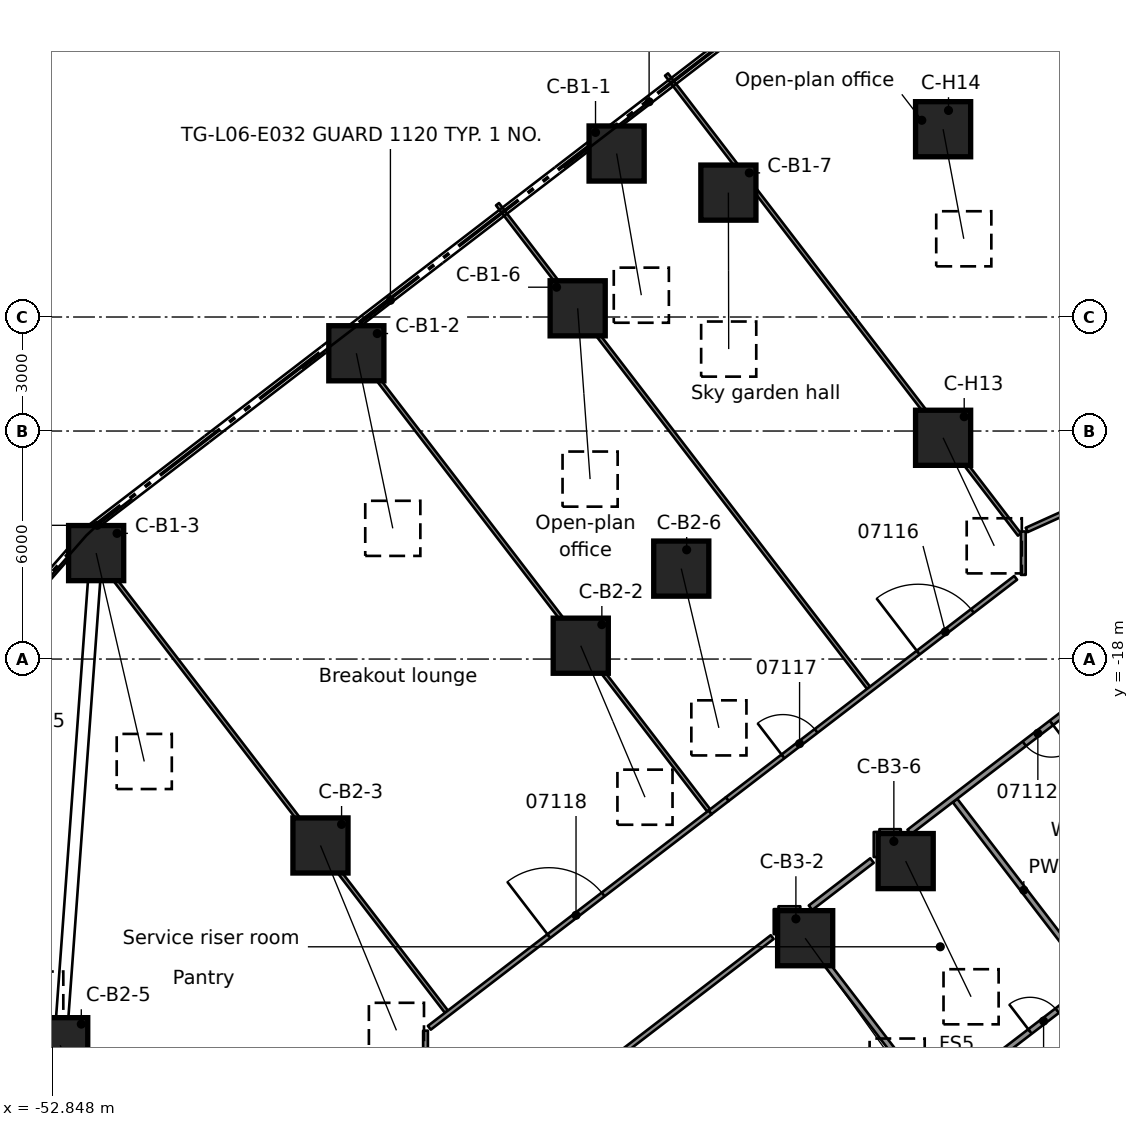
"""IFC4 building model, lengths in metres.
Left out: names, types, materials, properties, quantities, classifications, styles, units other than length and angle.
Written with IfcOpenShell. Run it as: python <this file> out.ifc"""

import sys

from ifc_helpers import new_model, si_unit, direction, frame, frame_2d, origin, origin_2d, place, context, subcontext, project, spatial, rectangle, extrude, element, fill, save


model = new_model("IFC4")
c1 = context("Model", 3, precision=1e-05, world=origin(), true_north=direction((0.0, 1.0)))
c2 = subcontext(c1, "Body", "Model", "MODEL_VIEW")
j1 = project(units=[si_unit("LENGTHUNIT", "METRE"), si_unit("PLANEANGLEUNIT", "RADIAN")], contexts=[c1])
p1 = place(None, origin())
s1 = spatial("IfcSite", under=j1, at=p1, CompositionType="ELEMENT")
p2 = place(p1, origin())
s2 = spatial("IfcBuilding", under=s1, at=p2, CompositionType="ELEMENT")
p3 = place(p2, frame((0.0, 0.0, 33.3)))
s3 = spatial("IfcBuildingStorey", under=s2, at=p3, CompositionType="ELEMENT", Elevation=33.3)
p4 = place(p3, frame((-37.991, -4.698, 0.58), z_axis=(0.137353584737, -0.787899789229, 0.600289859063), x_axis=(0.985142543064, 0.171738667298, 0.0)))
e1 = element("IfcColumn", 1, at=p4, inside=s3, PredefinedType="COLUMN", context=c2, shape_type="SweptSolid", body=[
    extrude(rectangle(XDim=1.45, YDim=1.45, at=origin_2d()), origin(), (0.0, 0.0, 1.0), 4.732),
])
p5 = place(p3, frame((-44.84, -9.954, 0.626), z_axis=(0.175985891109, -0.845431202961, 0.504256925773), x_axis=(0.979014073613, 0.20379264871, 0.0)))
e2 = element("IfcColumn", 2, at=p5, inside=s3, PredefinedType="COLUMN", context=c2, shape_type="SweptSolid", body=[
    extrude(rectangle(XDim=1.45, YDim=1.45, at=origin_2d()), origin(), (0.0, 0.0, 1.0), 5.449),
])
p6 = place(p3, frame((-51.687, -15.212, 0.654), z_axis=(0.20296345223, -0.878973423379, 0.431522372598), x_axis=(0.974361208205, 0.224989412964, 0.0)))
e3 = element("IfcColumn", 3, at=p6, inside=s3, PredefinedType="COLUMN", context=c2, shape_type="SweptSolid", body=[
    extrude(rectangle(XDim=1.45, YDim=1.45, at=origin_2d()), origin(), (0.0, 0.0, 1.0), 6.238),
])
p7 = place(p3, frame((-54.884, -20.946, 0.666), z_axis=(0.237851709207, -0.887565661499, 0.394529797296), x_axis=(0.965917879508, 0.258848701071, 0.0)))
e4 = element("IfcColumn", 4, at=p7, inside=s3, PredefinedType="COLUMN", context=c2, shape_type="SweptSolid", body=[
    extrude(rectangle(XDim=1.45, YDim=1.45, at=origin_2d()), origin(), (0.0, 0.0, 1.0), 6.761),
])
p8 = place(p3, frame((-39.016, -8.771, 0.618), z_axis=(0.06189008129, -0.85015725844, 0.522878813647), x_axis=(0.997360682952, 0.072606253879, 0.0)))
e5 = element("IfcColumn", 5, at=p8, inside=s3, PredefinedType="COLUMN", context=c2, shape_type="SweptSolid", body=[
    extrude(rectangle(XDim=1.45, YDim=1.45, at=origin_2d()), origin(), (0.0, 0.0, 1.0), 5.286),
])
p9 = place(p3, frame((-35.05, -5.727, 0.599), z_axis=(0.001617929852, -0.826762154334, 0.562549306697), x_axis=(0.999998085184, 0.001956943415, 0.0)))
e6 = element("IfcColumn", 6, at=p9, inside=s3, PredefinedType="COLUMN", context=c2, shape_type="SweptSolid", body=[
    extrude(rectangle(XDim=1.45, YDim=1.45, at=origin_2d()), origin(), (0.0, 0.0, 1.0), 4.979),
])
p10 = place(p3, frame((-38.935, -17.649, 0.61), z_axis=(0.328456976926, -0.774735201136, 0.540278985737), x_axis=(0.920675138709, 0.390329718267, 0.0)))
e7 = element("IfcColumn", 7, at=p10, inside=s3, PredefinedType="COLUMN", context=c2, shape_type="SweptSolid", body=[
    extrude(rectangle(XDim=1.45, YDim=1.45, at=origin_2d()), origin(), (0.0, 0.0, 1.0), 5.145),
])
p11 = place(p3, frame((-45.784, -22.905, 0.644), z_axis=(0.337825549268, -0.822160444585, 0.45817693266), x_axis=(0.924959508437, 0.380065662422, 0.0)))
e8 = element("IfcColumn", 8, at=p11, inside=s3, PredefinedType="COLUMN", context=c2, shape_type="SweptSolid", body=[
    extrude(rectangle(XDim=1.45, YDim=1.45, at=origin_2d()), origin(), (0.0, 0.0, 1.0), 5.917),
])
p12 = place(p3, frame((-52.633, -28.161, 0.666), z_axis=(0.342432498317, -0.852060724604, 0.395894563846), x_axis=(0.927871568112, 0.372899923692, 0.0)))
e9 = element("IfcColumn", 9, at=p12, inside=s3, PredefinedType="COLUMN", context=c2, shape_type="SweptSolid", body=[
    extrude(rectangle(XDim=1.45, YDim=1.45, at=origin_2d()), origin(), (0.0, 0.0, 1.0), 6.74),
])
p13 = place(p3, frame((-36.29, -15.62, 0.609), z_axis=(0.193103863156, -0.817465083831, 0.542643284997), x_axis=(0.973215294327, 0.229895608674, 0.0)))
e10 = element("IfcColumn", 10, at=p13, inside=s3, PredefinedType="COLUMN", context=c2, shape_type="SweptSolid", body=[
    extrude(rectangle(XDim=1.45, YDim=1.45, at=origin_2d()), origin(), (0.0, 0.0, 1.0), 5.127),
])
p14 = place(p3, frame((-33.03, -25.345, 0.601), z_axis=(0.484075605361, -0.672785526742, 0.559491236125), x_axis=(0.811723079597, 0.584042500208, 0.0)))
e11 = element("IfcColumn", 11, at=p14, inside=s3, PredefinedType="COLUMN", context=c2, shape_type="SweptSolid", body=[
    extrude(rectangle(XDim=1.45, YDim=1.45, at=origin_2d()), origin(), (0.0, 0.0, 1.0), 5.001),
])
p15 = place(p3, frame((-30.385, -23.316, 0.591), z_axis=(0.353875242444, -0.734106635021, 0.579534089768), x_axis=(0.90080181457, 0.434230458244, 0.0)))
e12 = element("IfcColumn", 12, at=p15, inside=s3, PredefinedType="COLUMN", context=c2, shape_type="SweptSolid", body=[
    extrude(rectangle(XDim=1.45, YDim=1.45, at=origin_2d()), origin(), (0.0, 0.0, 1.0), 4.863),
])
p16 = place(p3, frame((-29.4, -12.178, 0.53), z_axis=(0.312560635038, -0.660215598589, 0.682950373603), x_axis=(0.903829481424, 0.427892823623, 0.0)))
e13 = element("IfcColumn", 13, at=p16, inside=s3, PredefinedType="COLUMN", context=c2, shape_type="SweptSolid", body=[
    extrude(rectangle(XDim=1.45, YDim=1.45, at=origin_2d()), origin(), (0.0, 0.0, 1.0), 4.306),
])
p17 = place(p3, frame((-29.4, -4.059, 0.508), z_axis=(0.130006651481, -0.68901191234, 0.712994288353), x_axis=(0.98266050942, 0.185413924034, 0.0)))
e14 = element("IfcColumn", 14, at=p17, inside=s3, PredefinedType="COLUMN", context=c2, shape_type="SweptSolid", body=[
    extrude(rectangle(XDim=1.45, YDim=1.45, at=origin_2d()), origin(), (0.0, 0.0, 1.0), 4.184),
])
p18 = place(p3, frame((-52.2, -14.599, 0.0), z_axis=(0.0, 0.0, 1.0), x_axis=(0.608803805545, -0.793320821833, 0.0)))
e15 = element("IfcWall", 15, at=p18, inside=s3, PredefinedType="PARTITIONING", context=c2, shape_type="SweptSolid", body=[
    extrude(rectangle(XDim=15.982, YDim=0.1, at=frame_2d((7.991, 0.0))), origin(), (0.0, 0.0, 1.0), 3.56),
])
p19 = place(p3, frame((-45.331, -9.259, 0.0), z_axis=(0.0, 0.0, 1.0), x_axis=(0.608773776811, -0.793343865337, 0.0)))
e16 = element("IfcWall", 16, at=p19, inside=s3, PredefinedType="PARTITIONING", context=c2, shape_type="SweptSolid", body=[
    extrude(rectangle(XDim=16.037, YDim=0.1, at=frame_2d((8.019, 0.0))), origin(), (0.0, 0.0, 1.0), 3.56),
])
p20 = place(p3, frame((-33.482, -24.701, 0.0), z_axis=(0.0, 0.0, 1.0), x_axis=(0.608730316576, -0.793377212731, 0.0)))
e17 = element("IfcWall", 17, at=p20, inside=s3, PredefinedType="PARTITIONING", context=c2, shape_type="SweptSolid", body=[
    extrude(rectangle(XDim=6.261, YDim=0.15, at=frame_2d((3.13, 0.0))), origin(), (0.0, 0.0, 1.0), 3.56),
])
p21 = place(p3, frame((-41.126, -6.032, 0.0), z_axis=(0.0, 0.0, 1.0), x_axis=(0.608773776811, -0.793343865337, 0.0)))
e18 = element("IfcWall", 18, at=p21, inside=s3, PredefinedType="PARTITIONING", context=c2, shape_type="SweptSolid", body=[
    extrude(rectangle(XDim=16.037, YDim=0.1, at=frame_2d((8.019, 0.0))), origin(), (0.0, 0.0, 1.0), 3.56),
])
p22 = place(p3, frame((-29.087, -21.722, 0.0), z_axis=(0.0, 0.0, 1.0), x_axis=(0.608744291625, -0.793366489975, 0.0)))
e19 = element("IfcWall", 19, at=p22, inside=s3, PredefinedType="PARTITIONING", context=c2, shape_type="SweptSolid", body=[
    extrude(rectangle(XDim=5.948, YDim=0.15, at=frame_2d((2.974, 0.0))), origin(), (0.0, 0.0, 1.0), 3.56),
])
p23 = place(p3, frame((-36.678, -2.619, 0.0), z_axis=(0.0, 0.0, 1.0), x_axis=(0.608725798764, -0.793380679069, 0.0)))
e20 = element("IfcWall", 20, at=p23, inside=s3, PredefinedType="PARTITIONING", context=c2, shape_type="SweptSolid", body=[
    extrude(rectangle(XDim=15.256, YDim=0.1, at=frame_2d((7.628, 0.0))), origin(), (0.0, 0.0, 1.0), 3.56),
])
p24 = place(p3, frame((-33.731, -24.58, 0.0), z_axis=(0.0, 0.0, 1.0), x_axis=(1.0, 0.0, 0.0)))
e21 = element("IfcWall", 21, at=p24, inside=s3, PredefinedType="PARTITIONING", context=c2, shape_type="SweptSolid", body=[
    extrude(rectangle(XDim=0.573, YDim=0.15, at=frame_2d((0.287, 0.0))), origin(), (0.0, 0.0, 1.0), 3.56),
])
p25 = place(p3, frame((-31.075, -22.551, 0.0), z_axis=(0.0, 0.0, 1.0), x_axis=(1.0, 0.0, 0.0)))
e22 = element("IfcWall", 22, at=p25, inside=s3, PredefinedType="PARTITIONING", context=c2, shape_type="SweptSolid", body=[
    extrude(rectangle(XDim=0.562, YDim=0.15, at=frame_2d((0.281, 0.0))), origin(), (0.0, 0.0, 1.0), 3.56),
])
p26 = place(p3, frame((-27.201, -14.603, 0.0), z_axis=(0.0, 0.0, 1.0), x_axis=(0.911401146152, 0.411519077071, 0.0)))
e23 = element("IfcWall", 23, at=p26, inside=s3, PredefinedType="PARTITIONING", context=c2, shape_type="SweptSolid", body=[
    extrude(rectangle(XDim=1.354, YDim=0.125, at=frame_2d((0.677, 0.0))), origin(), (0.0, 0.0, 1.0), 3.56),
])
p27 = place(p3, frame((-29.176, -29.382, 0.0), z_axis=(0.0, 0.0, 1.0), x_axis=(0.793471421385, 0.608607511821, 0.0)))
e24 = element("IfcWall", 24, at=p27, inside=s3, PredefinedType="PARTITIONING", context=c2, shape_type="SweptSolid", body=[
    extrude(rectangle(XDim=9.32, YDim=0.15, at=frame_2d((4.66, 0.0))), origin(), (0.0, 0.0, 1.0), 3.56),
])
p28 = place(p27, frame((2.6, 0.0, 0.0)))
e25 = element("IfcOpeningElement", 25, at=p28, cuts=e24, PredefinedType="OPENING", context=c2, shape_type="SweptSolid", body=[
    extrude(rectangle(XDim=0.9, YDim=2.1, at=frame_2d((0.45, 1.05))), frame((0.0, 0.085, 0.0), z_axis=(0.0, -1.0, 0.0), x_axis=(1.0, 0.0, 0.0)), (0.0, 0.0, 1.0), 0.17),
])
p29 = place(p3, frame((-39.784, -29.835, 0.0), z_axis=(0.0, 0.0, 1.0), x_axis=(0.793235050969, 0.608915555652, 0.0)))
e26 = element("IfcWall", 26, at=p29, inside=s3, PredefinedType="PARTITIONING", context=c2, shape_type="SweptSolid", body=[
    extrude(rectangle(XDim=7.421, YDim=0.125, at=frame_2d((3.711, 0.0))), origin(), (0.0, 0.0, 1.0), 3.56),
])
p30 = place(p3, frame((-32.889, -24.544, 0.0), z_axis=(0.0, 0.0, 1.0), x_axis=(0.793242097783, 0.608906375648, 0.0)))
e27 = element("IfcWall", 27, at=p30, inside=s3, PredefinedType="PARTITIONING", context=c2, shape_type="SweptSolid", body=[
    extrude(rectangle(XDim=2.04, YDim=0.15, at=frame_2d((1.02, 0.0))), origin(), (0.0, 0.0, 1.0), 3.56),
])
p31 = place(p3, frame((-24.685, -18.25, 0.0), z_axis=(0.0, 0.0, 1.0), x_axis=(-0.793443961698, -0.608643310687, 0.0)))
e28 = element("IfcWall", 28, at=p31, inside=s3, PredefinedType="PARTITIONING", context=c2, shape_type="SweptSolid", body=[
    extrude(rectangle(XDim=7.067, YDim=0.15, at=frame_2d((3.533, 0.0))), origin(), (0.0, 0.0, 1.0), 3.56),
])
p32 = place(p31, frame((2.35, 0.0, 0.0)))
e29 = element("IfcOpeningElement", 29, at=p32, cuts=e28, PredefinedType="OPENING", context=c2, shape_type="SweptSolid", body=[
    extrude(rectangle(XDim=0.9, YDim=2.1, at=frame_2d((0.45, 1.05))), frame((0.0, 0.085, 0.0), z_axis=(0.0, -1.0, 0.0), x_axis=(1.0, 0.0, 0.0)), (0.0, 0.0, 1.0), 0.17),
])
p33 = place(p3, frame((-42.919, -27.702, 0.0), z_axis=(0.0, 0.0, 1.0), x_axis=(0.793470923698, 0.60860816068, 0.0)))
e30 = element("IfcWall", 30, at=p33, inside=s3, PredefinedType="PARTITIONING", context=c2, shape_type="SweptSolid", body=[
    extrude(rectangle(XDim=9.315, YDim=0.125, at=frame_2d((4.657, 0.0))), origin(), (0.0, 0.0, 1.0), 3.56),
])
p34 = place(p33, frame((3.964, 0.0, 0.0)))
e31 = element("IfcOpeningElement", 31, at=p34, cuts=e30, PredefinedType="OPENING", context=c2, shape_type="SweptSolid", body=[
    extrude(rectangle(XDim=1.8, YDim=2.1, at=frame_2d((0.9, 1.05))), frame((0.0, 0.073, 0.0), z_axis=(0.0, -1.0, 0.0), x_axis=(1.0, 0.0, 0.0)), (0.0, 0.0, 1.0), 0.145),
])
p35 = place(p3, frame((-35.081, -21.687, 0.0), z_axis=(0.0, 0.0, 1.0), x_axis=(0.793358624224, 0.608754542792, 0.0)))
e32 = element("IfcWall", 32, at=p35, inside=s3, PredefinedType="PARTITIONING", context=c2, shape_type="SweptSolid", body=[
    extrude(rectangle(XDim=9.567, YDim=0.125, at=frame_2d((4.784, 0.0))), origin(), (0.0, 0.0, 1.0), 3.56),
])
p36 = place(p35, frame((6.334, 0.0, 0.0)))
e33 = element("IfcOpeningElement", 33, at=p36, cuts=e32, PredefinedType="OPENING", context=c2, shape_type="SweptSolid", body=[
    extrude(rectangle(XDim=1.8, YDim=2.1, at=frame_2d((0.9, 1.05))), frame((0.0, 0.073, 0.0), z_axis=(0.0, -1.0, 0.0), x_axis=(1.0, 0.0, 0.0)), (0.0, 0.0, 1.0), 0.145),
])
p37 = place(p35, frame((1.85, 0.0, 0.0)))
e34 = element("IfcOpeningElement", 34, at=p37, cuts=e32, PredefinedType="OPENING", context=c2, shape_type="SweptSolid", body=[
    extrude(rectangle(XDim=1.1, YDim=2.1, at=frame_2d((0.55, 1.05))), frame((0.0, 0.073, 0.0), z_axis=(0.0, -1.0, 0.0), x_axis=(1.0, 0.0, 0.0)), (0.0, 0.0, 1.0), 0.145),
])
p38 = place(p3, frame((-35.53, -22.032, 0.0), z_axis=(0.0, 0.0, 1.0), x_axis=(0.792960485916, 0.609273065035, 0.0)))
e35 = element("IfcWall", 35, at=p38, inside=s3, PredefinedType="PARTITIONING", context=c2, shape_type="SweptSolid", body=[
    extrude(rectangle(XDim=0.566, YDim=0.125, at=frame_2d((0.283, 0.0))), origin(), (0.0, 0.0, 1.0), 3.56),
])
p39 = place(p3, frame((-27.289, -15.785, 0.0), z_axis=(0.0, 0.0, 1.0), x_axis=(0.0, 1.0, 0.0)))
e36 = element("IfcWall", 36, at=p39, inside=s3, PredefinedType="PARTITIONING", context=c2, shape_type="SweptSolid", body=[
    extrude(rectangle(XDim=1.142, YDim=0.125, at=frame_2d((0.571, 0.0))), origin(), (0.0, 0.0, 1.0), 3.56),
])
p40 = place(p3, frame((-31.15, -23.209, 0.0), z_axis=(0.0, 0.0, 1.0), x_axis=(0.0, 1.0, 0.0)))
e37 = element("IfcWall", 37, at=p40, inside=s3, PredefinedType="PARTITIONING", context=c2, shape_type="SweptSolid", body=[
    extrude(rectangle(XDim=0.658, YDim=0.15, at=frame_2d((0.329, 0.0))), origin(), (0.0, 0.0, 1.0), 3.56),
])
p41 = place(p3, frame((-33.794, -25.239, 0.0), z_axis=(0.0, 0.0, 1.0), x_axis=(0.0, 1.0, 0.0)))
e38 = element("IfcWall", 38, at=p41, inside=s3, PredefinedType="PARTITIONING", context=c2, shape_type="SweptSolid", body=[
    extrude(rectangle(XDim=0.659, YDim=0.125, at=frame_2d((0.33, 0.0))), origin(), (0.0, 0.0, 1.0), 3.56),
])
p42 = place(p3, frame((-43.02, -28.534, 0.0), z_axis=(0.0, 0.0, 1.0), x_axis=(0.0, 1.0, 0.0)))
e39 = element("IfcWall", 39, at=p42, inside=s3, PredefinedType="PARTITIONING", context=c2, shape_type="SweptSolid", body=[
    extrude(rectangle(XDim=0.755, YDim=0.125, at=frame_2d((0.377, 0.0))), origin(), (0.0, 0.0, 1.0), 3.56),
])
p43 = place(p28, origin())
e40 = element("IfcDoor", 40, at=p43, inside=s3, OperationType="SINGLE_SWING_LEFT", PredefinedType="DOOR", context=c2, shape_type="SweptSolid", body=[
    extrude(rectangle(XDim=0.9, YDim=2.1, at=frame_2d((0.45, 1.05))), frame((0.0, 0.025, 0.0), z_axis=(0.0, -1.0, 0.0), x_axis=(1.0, 0.0, 0.0)), (0.0, 0.0, 1.0), 0.05),
])
fill(e25, e40)
p44 = place(p32, origin())
e41 = element("IfcDoor", 41, at=p44, inside=s3, OperationType="SINGLE_SWING_LEFT", PredefinedType="DOOR", context=c2, shape_type="SweptSolid", body=[
    extrude(rectangle(XDim=0.9, YDim=2.1, at=frame_2d((0.45, 1.05))), frame((0.0, 0.025, 0.0), z_axis=(0.0, -1.0, 0.0), x_axis=(1.0, 0.0, 0.0)), (0.0, 0.0, 1.0), 0.05),
])
fill(e29, e41)
p45 = place(p36, origin())
e42 = element("IfcDoor", 42, at=p45, inside=s3, OperationType="DOUBLE_DOOR_SINGLE_SWING", PredefinedType="DOOR", context=c2, shape_type="SweptSolid", body=[
    extrude(rectangle(XDim=1.8, YDim=2.1, at=frame_2d((0.9, 1.05))), frame((0.0, 0.025, 0.0), z_axis=(0.0, -1.0, 0.0), x_axis=(1.0, 0.0, 0.0)), (0.0, 0.0, 1.0), 0.05),
])
fill(e33, e42)
p46 = place(p37, origin())
e43 = element("IfcDoor", 43, at=p46, inside=s3, OperationType="SINGLE_SWING_LEFT", PredefinedType="DOOR", context=c2, shape_type="SweptSolid", body=[
    extrude(rectangle(XDim=1.1, YDim=2.1, at=frame_2d((0.55, 1.05))), frame((0.0, 0.025, 0.0), z_axis=(0.0, -1.0, 0.0), x_axis=(1.0, 0.0, 0.0)), (0.0, 0.0, 1.0), 0.05),
])
fill(e34, e43)
p47 = place(p34, origin())
e44 = element("IfcDoor", 44, at=p47, inside=s3, OperationType="DOUBLE_DOOR_SINGLE_SWING", PredefinedType="DOOR", context=c2, shape_type="SweptSolid", body=[
    extrude(rectangle(XDim=1.8, YDim=2.1, at=frame_2d((0.9, 1.05))), frame((0.0, 0.025, 0.0), z_axis=(0.0, -1.0, 0.0), x_axis=(1.0, 0.0, 0.0)), (0.0, 0.0, 1.0), 0.05),
])
fill(e31, e44)
save(model, sys.argv[1])
